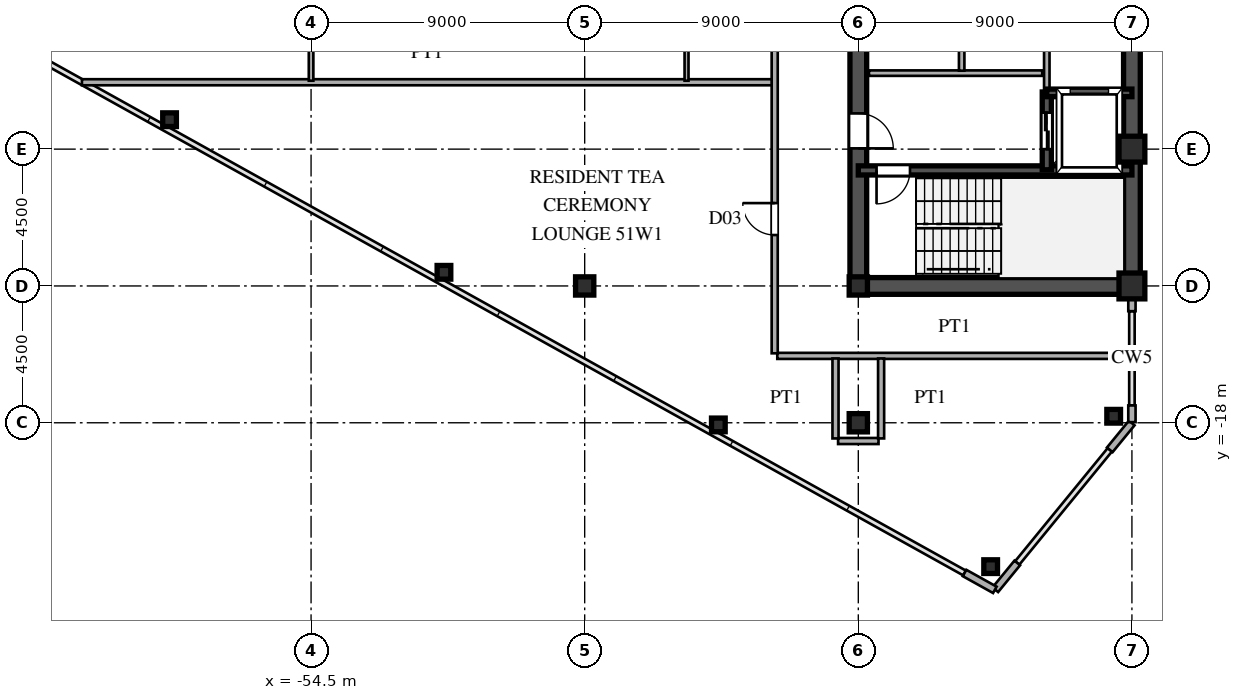
"""IFC4 building model, lengths in metres.
Left out: names, types, materials, properties, quantities, classifications, styles, units other than length and angle.
Written with IfcOpenShell. Run it as: python <this file> out.ifc"""

import sys

from ifc_helpers import new_model, si_unit, direction, frame, frame_2d, origin, origin_2d, place, context, subcontext, project, spatial, rectangle, hollow_rectangle, i_section, extrude, source, transform, mapped, element, fill, save


model = new_model("IFC4")
c1 = context("Model", 3, precision=1e-05, world=origin(), true_north=direction((0.0, 1.0)))
c2 = subcontext(c1, "Body", "Model", "MODEL_VIEW")
j1 = project(units=[si_unit("LENGTHUNIT", "METRE"), si_unit("PLANEANGLEUNIT", "RADIAN")], contexts=[c1])
p1 = place(None, origin())
s1 = spatial("IfcSite", under=j1, at=p1, CompositionType="ELEMENT")
p2 = place(p1, origin())
s2 = spatial("IfcBuilding", under=s1, at=p2, CompositionType="ELEMENT")
p3 = place(p2, frame((0.0, 0.0, 192.3)))
s3 = spatial("IfcBuildingStorey", under=s2, at=p3, CompositionType="ELEMENT", Elevation=192.3)
m1 = source(origin(), c2, "Body", "SweptSolid", [
    extrude(hollow_rectangle(XDim=0.85, YDim=0.85, WallThickness=0.036, at=origin_2d()), origin(), (0.0, 0.0, 1.0), 3.6),
])
for number, where, z_axis, x_axis in (
    (1, (-27.5, -13.5, 0.0), (0.0, 0.0, 1.0), (1.0, 0.0, 0.0)),
    (2, (-27.5, -9.0, 0.0), (0.0, 0.0, 1.0), (1.0, 0.0, 0.0)),
):
    element("IfcColumn", number, at=place(p3, frame(where, z_axis=z_axis, x_axis=x_axis)), inside=s3, PredefinedType="COLUMN", context=c2, shape_type="MappedRepresentation", body=[
        mapped(m1, transform((0.0, 0.0, 0.0), scale=1.0)),
    ])
m2 = source(origin(), c2, "Body", "SweptSolid", [
    extrude(i_section(OverallWidth=0.6, OverallDepth=0.6, WebThickness=0.025, FlangeThickness=0.04, at=origin_2d()), origin(), (0.0, 0.0, 1.0), 3.6),
])
for number, where, z_axis, x_axis in (
    (3, (-36.5, -18.0, 0.0), (0.0, 0.0, 1.0), (1.0, 0.0, 0.0)),
    (4, (-36.5, -13.5, 0.0), (0.0, 0.0, 1.0), (1.0, 0.0, 0.0)),
    (5, (-45.5, -13.5, 0.0), (0.0, 0.0, 1.0), (1.0, 0.0, 0.0)),
):
    element("IfcColumn", number, at=place(p3, frame(where, z_axis=z_axis, x_axis=x_axis)), inside=s3, PredefinedType="COLUMN", context=c2, shape_type="MappedRepresentation", body=[
        mapped(m2, transform((0.0, 0.0, 0.0), scale=1.0)),
    ])
m3 = source(origin(), c2, "Body", "SweptSolid", [
    extrude(hollow_rectangle(XDim=0.45, YDim=0.45, WallThickness=0.018, at=origin_2d()), origin(), (0.0, 0.0, 1.0), 3.6),
])
for number, where, z_axis, x_axis in (
    (6, (-28.1, -17.786, 0.0), (0.0, 0.0, 1.0), (1.0, 0.0, 0.0)),
    (7, (-32.147, -22.732, 0.0), (0.0, 0.0, 1.0), (1.0, 0.0, 0.0)),
    (8, (-41.104, -18.071, 0.0), (0.0, 0.0, 1.0), (1.0, 0.0, 0.0)),
    (9, (-50.129, -13.051, 0.0), (0.0, 0.0, 1.0), (1.0, 0.0, 0.0)),
    (10, (-59.155, -8.031, 0.0), (0.0, 0.0, 1.0), (1.0, 0.0, 0.0)),
):
    element("IfcColumn", number, at=place(p3, frame(where, z_axis=z_axis, x_axis=x_axis)), inside=s3, PredefinedType="COLUMN", context=c2, shape_type="MappedRepresentation", body=[
        mapped(m3, transform((0.0, 0.0, 0.0), scale=1.0)),
    ])
p4 = place(p3, frame((-27.5, -17.98, 0.0), z_axis=(0.0, 0.0, 1.0), x_axis=(0.0, 1.0, 0.0)))
e11 = element("IfcWall", 11, at=p4, inside=s3, PredefinedType="SOLIDWALL", context=c2, shape_type="SweptSolid", body=[
    extrude(rectangle(XDim=0.55, YDim=0.24, at=frame_2d((0.275, 0.0))), origin(), (0.0, 0.0, 1.0), 3.38),
])
p5 = place(p3, frame((-27.5, -14.33, 0.0), z_axis=(0.0, 0.0, 1.0), x_axis=(0.0, 1.0, 0.0)))
e12 = element("IfcWall", 12, at=p5, inside=s3, PredefinedType="SOLIDWALL", context=c2, shape_type="SweptSolid", body=[
    extrude(rectangle(XDim=0.55, YDim=0.24, at=frame_2d((0.275, 0.0))), origin(), (0.0, 0.0, 1.0), 1.88),
])
p6 = place(p3, frame((-33.005, -22.941, 0.0), z_axis=(0.0, 0.0, 1.0), x_axis=(0.87385402111, -0.486188389196, 0.0)))
e13 = element("IfcWall", 13, at=p6, inside=s3, PredefinedType="SOLIDWALL", context=c2, shape_type="SweptSolid", body=[
    extrude(rectangle(XDim=1.14, YDim=0.24, at=frame_2d((0.57, 0.0))), origin(), (0.0, 0.0, 1.0), 3.38),
])
for number, where, z_axis, x_axis in (
    (14, (-31.994, -23.492, 0.0), (0.0, 0.0, 1.0), (0.633, 0.774, 0.0)),
    (15, (-28.228, -18.89, 0.0), (0.0, 0.0, 1.0), (0.633, 0.774, 0.0)),
):
    element("IfcWall", number, at=place(p3, frame(where, z_axis=z_axis, x_axis=x_axis)), inside=s3, PredefinedType="SOLIDWALL", context=c2, shape_type="SweptSolid", body=[
        extrude(rectangle(XDim=1.14, YDim=0.24, at=frame_2d((0.57, 0.0))), origin(), (0.0, 0.0, 1.0), 3.38),
    ])
p7 = place(p3, frame((-27.5, -13.5, 0.0), z_axis=(0.0, 0.0, 1.0), x_axis=(0.0, 1.0, 0.0)))
e16 = element("IfcWall", 16, at=p7, inside=s3, PredefinedType="SHEAR", context=c2, shape_type="SweptSolid", body=[
    extrude(rectangle(XDim=12.2, YDim=0.55, at=frame_2d((6.1, 0.0))), origin(), (0.0, 0.0, 1.0), 3.38),
])
p8 = place(p3, frame((-36.5, -13.5, 0.0), z_axis=(0.0, 0.0, 1.0), x_axis=(1.0, 0.0, 0.0)))
e17 = element("IfcWall", 17, at=p8, inside=s3, PredefinedType="SHEAR", context=c2, shape_type="SweptSolid", body=[
    extrude(rectangle(XDim=9.0, YDim=0.55, at=frame_2d((4.5, 0.0))), origin(), (0.0, 0.0, 1.0), 3.38),
])
p9 = place(p3, frame((-36.5, -13.65, 0.0), z_axis=(0.0, 0.0, 1.0), x_axis=(0.0, 1.0, 0.0)))
e18 = element("IfcWall", 18, at=p9, inside=s3, PredefinedType="SHEAR", context=c2, shape_type="SweptSolid", body=[
    extrude(rectangle(XDim=7.15, YDim=0.55, at=frame_2d((3.575, 0.0))), origin(), (0.0, 0.0, 1.0), 3.38),
])
p10 = place(p9, frame((4.675, 0.0, 0.0)))
e19 = element("IfcOpeningElement", 19, at=p10, cuts=e18, PredefinedType="OPENING", context=c2, shape_type="SweptSolid", body=[
    extrude(rectangle(XDim=1.15, YDim=2.2, at=frame_2d((0.575, 1.1))), frame((0.0, 0.285, 0.0), z_axis=(0.0, -1.0, 0.0), x_axis=(1.0, 0.0, 0.0)), (0.0, 0.0, 1.0), 0.57),
])
p11 = place(p3, frame((-36.5, -6.5, 0.0), z_axis=(0.0, 0.0, 1.0), x_axis=(0.0, 1.0, 0.0)))
e20 = element("IfcWall", 20, at=p11, inside=s3, PredefinedType="SHEAR", context=c2, shape_type="SweptSolid", body=[
    extrude(rectangle(XDim=2.6, YDim=0.55, at=frame_2d((1.3, 0.0))), origin(), (0.0, 0.0, 1.0), 3.38),
])
p12 = place(p11, frame((0.825, 0.0, 0.0)))
e21 = element("IfcOpeningElement", 21, at=p12, cuts=e20, PredefinedType="OPENING", context=c2, shape_type="SweptSolid", body=[
    extrude(rectangle(XDim=0.95, YDim=2.15, at=frame_2d((0.475, 1.075))), frame((0.0, 0.285, 0.0), z_axis=(0.0, -1.0, 0.0), x_axis=(1.0, 0.0, 0.0)), (0.0, 0.0, 1.0), 0.57),
])
p13 = place(p3, frame((-36.5, -9.7, 0.0), z_axis=(0.0, 0.0, 1.0), x_axis=(1.0, 0.0, 0.0)))
e22 = element("IfcWall", 22, at=p13, inside=s3, PredefinedType="SHEAR", context=c2, shape_type="SweptSolid", body=[
    extrude(rectangle(XDim=9.0, YDim=0.3, at=frame_2d((4.5, 0.0))), origin(), (0.0, 0.0, 1.0), 3.38),
])
p14 = place(p13, frame((0.6, 0.0, 0.0)))
e23 = element("IfcOpeningElement", 23, at=p14, cuts=e22, PredefinedType="OPENING", context=c2, shape_type="SweptSolid", body=[
    extrude(rectangle(XDim=1.1, YDim=2.2, at=frame_2d((0.55, 1.1))), frame((0.0, 0.16, 0.0), z_axis=(0.0, -1.0, 0.0), x_axis=(1.0, 0.0, 0.0)), (0.0, 0.0, 1.0), 0.32),
])
p15 = place(p3, frame((-30.3, -7.15, 0.0), z_axis=(0.0, 0.0, 1.0), x_axis=(1.0, 0.0, 0.0)))
e24 = element("IfcWall", 24, at=p15, inside=s3, PredefinedType="SHEAR", context=c2, shape_type="SweptSolid", body=[
    extrude(rectangle(XDim=2.8, YDim=0.25, at=frame_2d((1.4, 0.0))), origin(), (0.0, 0.0, 1.0), 3.38),
])
p16 = place(p3, frame((-30.3, -9.68, 0.0), z_axis=(0.0, 0.0, 1.0), x_axis=(0.0, 1.0, 0.0)))
e25 = element("IfcWall", 25, at=p16, inside=s3, PredefinedType="SHEAR", context=c2, shape_type="SweptSolid", body=[
    extrude(rectangle(XDim=2.56, YDim=0.3, at=frame_2d((1.28, 0.0))), origin(), (0.0, 0.0, 1.0), 3.38),
])
p17 = place(p16, frame((0.68, 0.0, 0.0)))
e26 = element("IfcOpeningElement", 26, at=p17, cuts=e25, PredefinedType="OPENING", context=c2, shape_type="SweptSolid", body=[
    extrude(rectangle(XDim=1.2, YDim=2.25, at=frame_2d((0.6, 1.125))), frame((0.0, 0.16, 0.0), z_axis=(0.0, -1.0, 0.0), x_axis=(1.0, 0.0, 0.0)), (0.0, 0.0, 1.0), 0.32),
])
p18 = place(p3, frame((-36.15, -6.5, 0.0), z_axis=(0.0, 0.0, 1.0), x_axis=(1.0, 0.0, 0.0)))
e27 = element("IfcWall", 27, at=p18, inside=s3, PredefinedType="PARTITIONING", context=c2, shape_type="SweptSolid", body=[
    extrude(rectangle(XDim=5.7, YDim=0.18, at=frame_2d((2.85, 0.0))), origin(), (0.0, 0.0, 1.0), 3.38),
])
p19 = place(p3, frame((-33.1, -6.42, 0.0), z_axis=(0.0, 0.0, 1.0), x_axis=(0.0, 1.0, 0.0)))
e28 = element("IfcWall", 28, at=p19, inside=s3, PredefinedType="PARTITIONING", context=c2, shape_type="SweptSolid", body=[
    extrude(rectangle(XDim=5.04, YDim=0.18, at=frame_2d((2.52, 0.0))), origin(), (0.0, 0.0, 1.0), 3.38),
])
p20 = place(p3, frame((-30.3, -7.12, 0.0), z_axis=(0.0, 0.0, 1.0), x_axis=(0.0, 1.0, 0.0)))
e29 = element("IfcWall", 29, at=p20, inside=s3, PredefinedType="PARTITIONING", context=c2, shape_type="SweptSolid", body=[
    extrude(rectangle(XDim=5.74, YDim=0.18, at=frame_2d((2.87, 0.0))), origin(), (0.0, 0.0, 1.0), 3.38),
])
p21 = place(p3, frame((-37.165, -18.6, 0.0), z_axis=(0.0, 0.0, 1.0), x_axis=(1.0, 0.0, 0.0)))
e30 = element("IfcWall", 30, at=p21, inside=s3, PredefinedType="PARTITIONING", context=c2, shape_type="SweptSolid", body=[
    extrude(rectangle(XDim=1.33, YDim=0.2, at=frame_2d((0.665, 0.0))), origin(), (0.0, 0.0, 1.0), 3.38),
])
p22 = place(p3, frame((-39.165, -15.8, 0.0), z_axis=(0.0, 0.0, 1.0), x_axis=(1.0, 0.0, 0.0)))
e31 = element("IfcWall", 31, at=p22, inside=s3, PredefinedType="PARTITIONING", context=c2, shape_type="SweptSolid", body=[
    extrude(rectangle(XDim=11.665, YDim=0.2, at=frame_2d((5.833, 0.0))), origin(), (0.0, 0.0, 1.0), 3.38),
])
p23 = place(p3, frame((-62.037, -6.8, 0.0), z_axis=(0.0, 0.0, 1.0), x_axis=(1.0, 0.0, 0.0)))
e32 = element("IfcWall", 32, at=p23, inside=s3, PredefinedType="PARTITIONING", context=c2, shape_type="SweptSolid", body=[
    extrude(rectangle(XDim=22.707, YDim=0.2, at=frame_2d((11.354, 0.0))), origin(), (0.0, 0.0, 1.0), 3.38),
])
p24 = place(p3, frame((-54.5, -6.75, 0.0), z_axis=(0.0, 0.0, 1.0), x_axis=(0.0, 1.0, 0.0)))
e33 = element("IfcWall", 33, at=p24, inside=s3, PredefinedType="PARTITIONING", context=c2, shape_type="SweptSolid", body=[
    extrude(rectangle(XDim=13.5, YDim=0.15, at=frame_2d((6.75, 0.0))), origin(), (0.0, 0.0, 1.0), 2.78),
])
p25 = place(p24, frame((6.275, 0.0, 0.0)))
e34 = element("IfcOpeningElement", 34, at=p25, cuts=e33, PredefinedType="OPENING", context=c2, shape_type="SweptSolid", body=[
    extrude(rectangle(XDim=0.95, YDim=2.15, at=frame_2d((0.475, 1.075))), frame((0.0, 0.085, 0.0), z_axis=(0.0, -1.0, 0.0), x_axis=(1.0, 0.0, 0.0)), (0.0, 0.0, 1.0), 0.17),
])
p26 = place(p3, frame((-42.15, -6.75, 0.0), z_axis=(0.0, 0.0, 1.0), x_axis=(0.0, 1.0, 0.0)))
e35 = element("IfcWall", 35, at=p26, inside=s3, PredefinedType="PARTITIONING", context=c2, shape_type="SweptSolid", body=[
    extrude(rectangle(XDim=8.967, YDim=0.13, at=frame_2d((4.483, 0.0))), origin(), (0.0, 0.0, 1.0), 3.38),
])
p27 = place(p26, frame((6.275, 0.0, 0.0)))
e36 = element("IfcOpeningElement", 36, at=p27, cuts=e35, PredefinedType="OPENING", context=c2, shape_type="SweptSolid", body=[
    extrude(rectangle(XDim=0.95, YDim=2.15, at=frame_2d((0.475, 1.075))), frame((0.0, 0.075, 0.0), z_axis=(0.0, -1.0, 0.0), x_axis=(1.0, 0.0, 0.0)), (0.0, 0.0, 1.0), 0.15),
])
p28 = place(p3, frame((-39.25, -15.715, 0.0), z_axis=(0.0, 0.0, 1.0), x_axis=(0.0, 1.0, 0.0)))
e37 = element("IfcWall", 37, at=p28, inside=s3, PredefinedType="PARTITIONING", context=c2, shape_type="SweptSolid", body=[
    extrude(rectangle(XDim=31.43, YDim=0.2, at=frame_2d((15.715, 0.0))), origin(), (0.0, 0.0, 1.0), 3.38),
])
p29 = place(p28, frame((3.89, 0.0, 0.0)))
e38 = element("IfcOpeningElement", 38, at=p29, cuts=e37, PredefinedType="OPENING", context=c2, shape_type="SweptSolid", body=[
    extrude(rectangle(XDim=1.05, YDim=2.25, at=frame_2d((0.525, 1.125))), frame((0.0, 0.11, 0.0), z_axis=(0.0, -1.0, 0.0), x_axis=(1.0, 0.0, 0.0)), (0.0, 0.0, 1.0), 0.22),
])
p30 = place(p28, frame((14.986, 0.0, 0.0)))
e39 = element("IfcOpeningElement", 39, at=p30, cuts=e37, PredefinedType="OPENING", context=c2, shape_type="SweptSolid", body=[
    extrude(rectangle(XDim=1.05, YDim=2.25, at=frame_2d((0.525, 1.125))), frame((0.0, 0.11, 0.0), z_axis=(0.0, -1.0, 0.0), x_axis=(1.0, 0.0, 0.0)), (0.0, 0.0, 1.0), 0.22),
])
p31 = place(p28, frame((26.49, 0.0, 0.0)))
e40 = element("IfcOpeningElement", 40, at=p31, cuts=e37, PredefinedType="OPENING", context=c2, shape_type="SweptSolid", body=[
    extrude(rectangle(XDim=1.05, YDim=2.25, at=frame_2d((0.525, 1.125))), frame((0.0, 0.11, 0.0), z_axis=(0.0, -1.0, 0.0), x_axis=(1.0, 0.0, 0.0)), (0.0, 0.0, 1.0), 0.22),
])
for number, where, z_axis, x_axis in (
    (41, (-37.25, -18.515, 0.0), (0.0, 0.0, 1.0), (0.0, 1.0, 0.0)),
    (42, (-35.75, -18.515, 0.0), (0.0, 0.0, 1.0), (0.0, 1.0, 0.0)),
):
    element("IfcWall", number, at=place(p3, frame(where, z_axis=z_axis, x_axis=x_axis)), inside=s3, PredefinedType="PARTITIONING", context=c2, shape_type="SweptSolid", body=[
        extrude(rectangle(XDim=2.63, YDim=0.2, at=frame_2d((1.315, 0.0))), origin(), (0.0, 0.0, 1.0), 3.38),
    ])
m4 = source(origin(), c2, "Body", "SweptSolid", [
    extrude(rectangle(XDim=1.15, YDim=2.2, at=frame_2d((0.575, 1.1))), frame((0.0, 0.025, 0.0), z_axis=(0.0, -1.0, 0.0), x_axis=(1.0, 0.0, 0.0)), (0.0, 0.0, 1.0), 0.05),
])
p32 = place(p10, frame((1.15, 0.0, 0.0), z_axis=(0.0, 0.0, 1.0), x_axis=(-1.0, 0.0, 0.0)))
e43 = element("IfcDoor", 43, at=p32, inside=s3, OperationType="SINGLE_SWING_LEFT", PredefinedType="DOOR", context=c2, shape_type="MappedRepresentation", body=[
    mapped(m4, transform((0.0, 0.0, 0.0), scale=1.0)),
])
fill(e19, e43)
m5 = source(origin(), c2, "Body", "SweptSolid", [
    extrude(rectangle(XDim=1.1, YDim=2.2, at=frame_2d((0.55, 1.1))), frame((0.0, 0.025, 0.0), z_axis=(0.0, -1.0, 0.0), x_axis=(1.0, 0.0, 0.0)), (0.0, 0.0, 1.0), 0.05),
])
p33 = place(p14, frame((1.1, 0.0, 0.0), z_axis=(0.0, 0.0, 1.0), x_axis=(-1.0, 0.0, 0.0)))
e44 = element("IfcDoor", 44, at=p33, inside=s3, OperationType="SINGLE_SWING_LEFT", PredefinedType="DOOR", context=c2, shape_type="MappedRepresentation", body=[
    mapped(m5, transform((0.0, 0.0, 0.0), scale=1.0)),
])
fill(e23, e44)
m6 = source(origin(), c2, "Body", "SweptSolid", [
    extrude(rectangle(XDim=1.2, YDim=2.25, at=frame_2d((0.6, 1.125))), frame((0.0, 0.025, 0.0), z_axis=(0.0, -1.0, 0.0), x_axis=(1.0, 0.0, 0.0)), (0.0, 0.0, 1.0), 0.05),
])
p34 = place(p17, origin())
e45 = element("IfcDoor", 45, at=p34, inside=s3, OperationType="DOUBLE_DOOR_SLIDING", PredefinedType="DOOR", context=c2, shape_type="MappedRepresentation", body=[
    mapped(m6, transform((0.0, 0.0, 0.0), scale=1.0)),
])
fill(e26, e45)
m7 = source(origin(), c2, "Body", "SweptSolid", [
    extrude(rectangle(XDim=1.05, YDim=2.25, at=frame_2d((0.525, 1.125))), frame((0.0, 0.025, 0.0), z_axis=(0.0, -1.0, 0.0), x_axis=(1.0, 0.0, 0.0)), (0.0, 0.0, 1.0), 0.05),
])
p35 = place(p29, origin())
e46 = element("IfcDoor", 46, at=p35, inside=s3, OperationType="SINGLE_SWING_RIGHT", PredefinedType="DOOR", context=c2, shape_type="MappedRepresentation", body=[
    mapped(m7, transform((0.0, 0.0, 0.0), scale=1.0)),
])
fill(e38, e46)
save(model, sys.argv[1])
